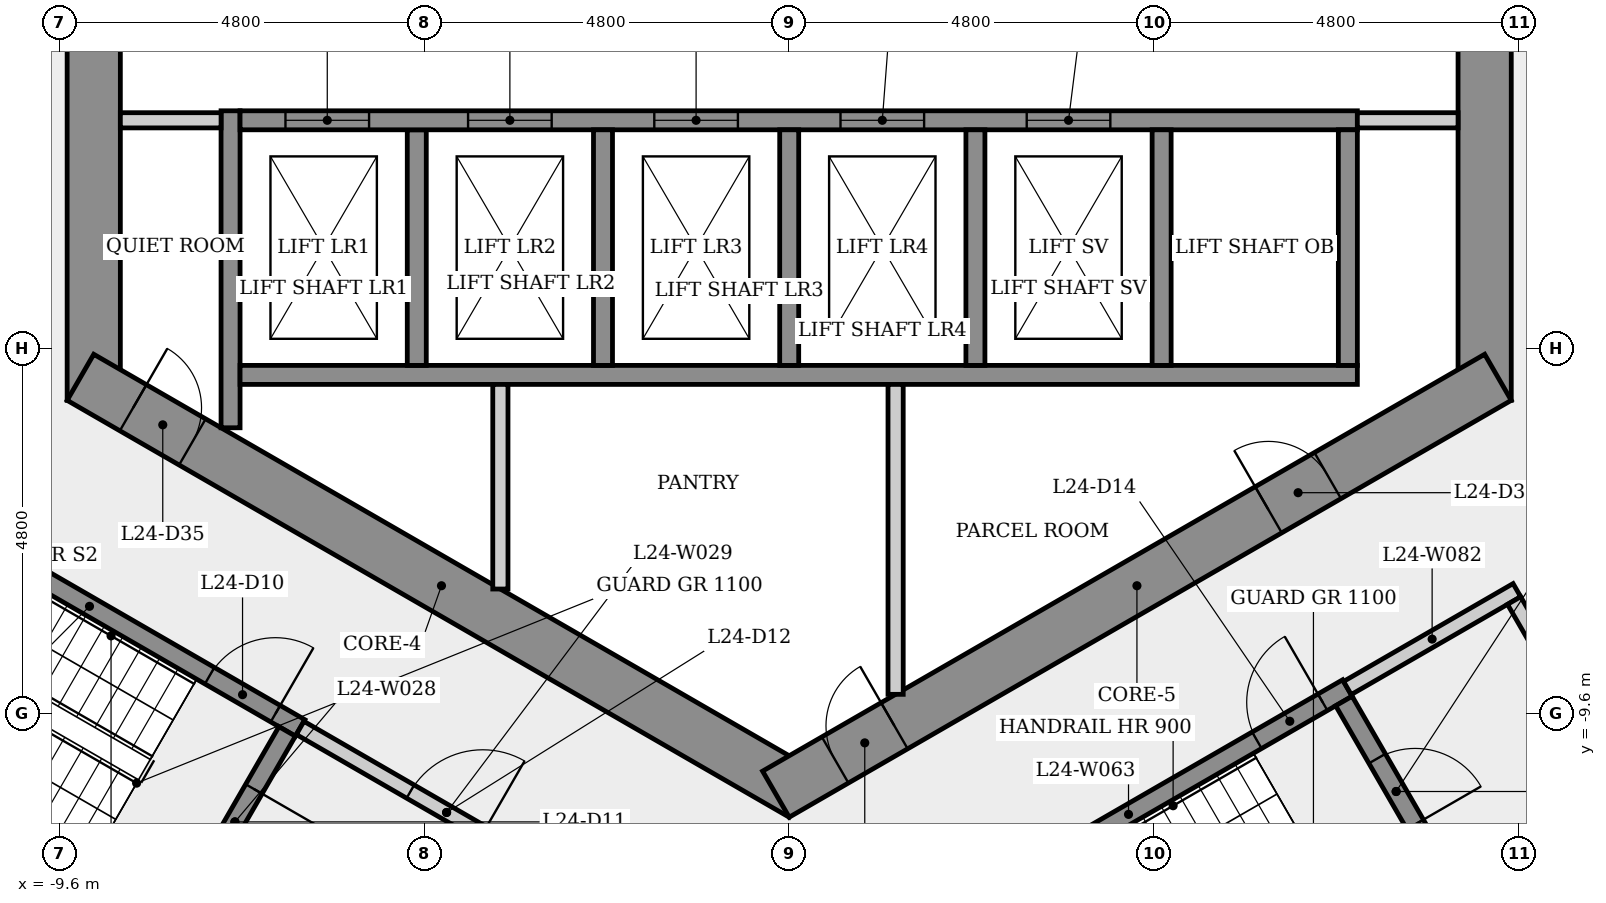
"""IFC4 building model, lengths in metres.
Left out: names, types, materials, properties, quantities, classifications, styles, units other than length and angle.
Written with IfcOpenShell. Run it as: python <this file> out.ifc"""

import sys

from ifc_helpers import new_model, si_unit, direction, frame, frame_2d, origin, place, context, subcontext, project, spatial, rectangle, extrude, element, fill, save


model = new_model("IFC4")
c1 = context("Model", 3, precision=1e-05, world=origin(), true_north=direction((0.0, 1.0)))
c2 = subcontext(c1, "Body", "Model", "MODEL_VIEW")
j1 = project(units=[si_unit("LENGTHUNIT", "METRE"), si_unit("PLANEANGLEUNIT", "RADIAN")], contexts=[c1])
p1 = place(None, origin())
s1 = spatial("IfcSite", under=j1, at=p1, CompositionType="ELEMENT")
p2 = place(p1, origin())
s2 = spatial("IfcBuilding", under=s1, at=p2, CompositionType="ELEMENT")
p3 = place(p2, frame((0.0, 0.0, 93.3)))
s3 = spatial("IfcBuildingStorey", under=s2, at=p3, CompositionType="ELEMENT", Elevation=93.3)
p4 = place(p3, frame((9.15, -5.485, 0.0), z_axis=(0.0, 0.0, 1.0), x_axis=(0.0, 1.0, 0.0)))
e1 = element("IfcWall", 1, at=p4, inside=s3, PredefinedType="SHEAR", context=c2, shape_type="SweptSolid", body=[
    extrude(rectangle(XDim=10.97, YDim=0.7, at=frame_2d((5.485, 0.0))), origin(), (0.0, 0.0, 1.0), 3.4),
])
p5 = place(p4, frame((4.685, 0.0, 0.0)))
e2 = element("IfcOpeningElement", 2, at=p5, cuts=e1, PredefinedType="OPENING", context=c2, shape_type="SweptSolid", body=[
    extrude(rectangle(XDim=1.6, YDim=2.1, at=frame_2d((0.8, 1.05))), frame((0.0, 0.36, 0.0), z_axis=(0.0, -1.0, 0.0), x_axis=(1.0, 0.0, 0.0)), (0.0, 0.0, 1.0), 0.72),
])
p6 = place(p3, frame((-9.15, 5.485, 0.0), z_axis=(0.0, 0.0, 1.0), x_axis=(0.0, -1.0, 0.0)))
e3 = element("IfcWall", 3, at=p6, inside=s3, PredefinedType="SHEAR", context=c2, shape_type="SweptSolid", body=[
    extrude(rectangle(XDim=10.97, YDim=0.7, at=frame_2d((5.485, 0.0))), origin(), (0.0, 0.0, 1.0), 3.4),
])
p7 = place(p6, frame((4.685, 0.0, 0.0)))
e4 = element("IfcOpeningElement", 4, at=p7, cuts=e3, PredefinedType="OPENING", context=c2, shape_type="SweptSolid", body=[
    extrude(rectangle(XDim=1.6, YDim=2.1, at=frame_2d((0.8, 1.05))), frame((0.0, 0.36, 0.0), z_axis=(0.0, -1.0, 0.0), x_axis=(1.0, 0.0, 0.0)), (0.0, 0.0, 1.0), 0.72),
])
p8 = place(p3, frame((-9.325, -5.182, 0.0), z_axis=(0.0, 0.0, 1.0), x_axis=(0.866023993627, -0.500002442456, 0.0)))
e5 = element("IfcWall", 5, at=p8, inside=s3, PredefinedType="SHEAR", context=c2, shape_type="SweptSolid", body=[
    extrude(rectangle(XDim=10.97, YDim=0.7, at=frame_2d((5.485, 0.0))), origin(), (0.0, 0.0, 1.0), 3.4),
])
p9 = place(p8, frame((0.801, 0.0, 0.0)))
e6 = element("IfcOpeningElement", 6, at=p9, cuts=e5, PredefinedType="OPENING", context=c2, shape_type="SweptSolid", body=[
    extrude(rectangle(XDim=0.9, YDim=2.1, at=frame_2d((0.45, 1.05))), frame((0.0, 0.36, 0.0), z_axis=(0.0, -1.0, 0.0), x_axis=(1.0, 0.0, 0.0)), (0.0, 0.0, 1.0), 0.72),
])
p10 = place(p3, frame((-0.175, -10.667, 0.0), z_axis=(0.0, 0.0, 1.0), x_axis=(0.866023993627, 0.500002442456, 0.0)))
e7 = element("IfcWall", 7, at=p10, inside=s3, PredefinedType="SHEAR", context=c2, shape_type="SweptSolid", body=[
    extrude(rectangle(XDim=10.97, YDim=0.7, at=frame_2d((5.485, 0.0))), origin(), (0.0, 0.0, 1.0), 3.4),
])
p11 = place(p10, frame((0.9, 0.0, 0.0)))
e8 = element("IfcOpeningElement", 8, at=p11, cuts=e7, PredefinedType="OPENING", context=c2, shape_type="SweptSolid", body=[
    extrude(rectangle(XDim=0.9, YDim=2.1, at=frame_2d((0.45, 1.05))), frame((0.0, 0.36, 0.0), z_axis=(0.0, -1.0, 0.0), x_axis=(1.0, 0.0, 0.0)), (0.0, 0.0, 1.0), 0.72),
])
p12 = place(p10, frame((7.483, 0.0, 0.0)))
e9 = element("IfcOpeningElement", 9, at=p12, cuts=e7, PredefinedType="OPENING", context=c2, shape_type="SweptSolid", body=[
    extrude(rectangle(XDim=0.9, YDim=2.1, at=frame_2d((0.45, 1.05))), frame((0.0, 0.36, 0.0), z_axis=(0.0, -1.0, 0.0), x_axis=(1.0, 0.0, 0.0)), (0.0, 0.0, 1.0), 0.72),
])
p13 = place(p3, frame((-11.977, -6.595, 0.0), z_axis=(0.0, 0.0, 1.0), x_axis=(0.866025499775, -0.499999833739, 0.0)))
e10 = element("IfcWall", 10, at=p13, inside=s3, PredefinedType="SHEAR", context=c2, shape_type="SweptSolid", body=[
    extrude(rectangle(XDim=6.4, YDim=0.25, at=frame_2d((3.2, 0.0))), origin(), (0.0, 0.0, 1.0), 3.05),
])
p14 = place(p13, frame((5.025, 0.0, 0.0)))
e11 = element("IfcOpeningElement", 11, at=p14, cuts=e10, PredefinedType="OPENING", context=c2, shape_type="SweptSolid", body=[
    extrude(rectangle(XDim=1.0, YDim=2.1, at=frame_2d((0.5, 1.05))), frame((0.0, 0.135, 0.0), z_axis=(0.0, -1.0, 0.0), x_axis=(1.0, 0.0, 0.0)), (0.0, 0.0, 1.0), 0.27),
])
p15 = place(p3, frame((-7.935, -12.393, 0.0), z_axis=(0.0, 0.0, 1.0), x_axis=(-0.866025499775, 0.499999833739, 0.0)))
e12 = element("IfcWall", 12, at=p15, inside=s3, PredefinedType="SHEAR", context=c2, shape_type="SweptSolid", body=[
    extrude(rectangle(XDim=6.4, YDim=0.25, at=frame_2d((3.2, 0.0))), origin(), (0.0, 0.0, 1.0), 3.05),
])
p16 = place(p3, frame((-7.35, -5.846, 0.0), z_axis=(0.0, 0.0, 1.0), x_axis=(0.0, 1.0, 0.0)))
e13 = element("IfcWall", 13, at=p16, inside=s3, PredefinedType="SHEAR", context=c2, shape_type="SweptSolid", body=[
    extrude(rectangle(XDim=4.171, YDim=0.25, at=frame_2d((2.085, 0.0))), origin(), (0.0, 0.0, 1.0), 3.05),
])
p17 = place(p3, frame((-7.475, -1.8, 0.0), z_axis=(0.0, 0.0, 1.0), x_axis=(-1.0, 0.0, 0.0)))
e14 = element("IfcWall", 14, at=p17, inside=s3, PredefinedType="PARTITIONING", context=c2, shape_type="SweptSolid", body=[
    extrude(rectangle(XDim=1.325, YDim=0.2, at=frame_2d((0.663, 0.0))), origin(), (0.0, 0.0, 1.0), 3.05),
])
p18 = place(p3, frame((-6.605, -9.841, 0.0), z_axis=(0.0, 0.0, 1.0), x_axis=(-0.499996545922, -0.866027397988, 0.0)))
e15 = element("IfcWall", 15, at=p18, inside=s3, PredefinedType="SHEAR", context=c2, shape_type="SweptSolid", body=[
    extrude(rectangle(XDim=2.75, YDim=0.25, at=frame_2d((1.375, 0.0))), origin(), (0.0, 0.0, 1.0), 3.05),
])
p19 = place(p18, frame((0.875, 0.0, 0.0)))
e16 = element("IfcOpeningElement", 16, at=p19, cuts=e15, PredefinedType="OPENING", context=c2, shape_type="SweptSolid", body=[
    extrude(rectangle(XDim=1.0, YDim=2.1, at=frame_2d((0.5, 1.05))), frame((0.0, 0.135, 0.0), z_axis=(0.0, -1.0, 0.0), x_axis=(1.0, 0.0, 0.0)), (0.0, 0.0, 1.0), 0.27),
])
p20 = place(p3, frame((-6.435, -9.795, 0.0), z_axis=(0.0, 0.0, 1.0), x_axis=(0.866012907634, -0.500021643343, 0.0)))
e17 = element("IfcWall", 17, at=p20, inside=s3, PredefinedType="PARTITIONING", context=c2, shape_type="SweptSolid", body=[
    extrude(rectangle(XDim=4.45, YDim=0.2, at=frame_2d((2.225, 0.0))), origin(), (0.0, 0.0, 1.0), 3.05),
])
p21 = place(p20, frame((1.675, 0.0, 0.0)))
e18 = element("IfcOpeningElement", 18, at=p21, cuts=e17, PredefinedType="OPENING", context=c2, shape_type="SweptSolid", body=[
    extrude(rectangle(XDim=1.1, YDim=2.1, at=frame_2d((0.55, 1.05))), frame((0.0, 0.11, 0.0), z_axis=(0.0, -1.0, 0.0), x_axis=(1.0, 0.0, 0.0)), (0.0, 0.0, 1.0), 0.22),
])
p22 = place(p3, frame((-7.225, -5.15, 0.0), z_axis=(0.0, 0.0, 1.0), x_axis=(1.0, 0.0, 0.0)))
e19 = element("IfcWall", 19, at=p22, inside=s3, PredefinedType="SHEAR", context=c2, shape_type="SweptSolid", body=[
    extrude(rectangle(XDim=14.7, YDim=0.25, at=frame_2d((7.35, 0.0))), origin(), (0.0, 0.0, 1.0), 3.05),
])
p23 = place(p3, frame((-4.9, -1.925, 0.0), z_axis=(0.0, 0.0, 1.0), x_axis=(0.0, -1.0, 0.0)))
e20 = element("IfcWall", 20, at=p23, inside=s3, PredefinedType="SHEAR", context=c2, shape_type="SweptSolid", body=[
    extrude(rectangle(XDim=3.1, YDim=0.25, at=frame_2d((1.55, 0.0))), origin(), (0.0, 0.0, 1.0), 3.4),
])
p24 = place(p3, frame((-7.225, -1.8, 0.0), z_axis=(0.0, 0.0, 1.0), x_axis=(1.0, 0.0, 0.0)))
e21 = element("IfcWall", 21, at=p24, inside=s3, PredefinedType="SHEAR", context=c2, shape_type="SweptSolid", body=[
    extrude(rectangle(XDim=14.7, YDim=0.25, at=frame_2d((7.35, 0.0))), origin(), (0.0, 0.0, 1.0), 3.05),
])
p25 = place(p24, frame((0.597, 0.0, 0.0)))
e22 = element("IfcOpeningElement", 22, at=p25, cuts=e21, PredefinedType="OPENING", context=c2, shape_type="SweptSolid", body=[
    extrude(rectangle(XDim=1.1, YDim=2.1, at=frame_2d((0.55, 1.05))), frame((0.0, 0.135, 0.0), z_axis=(0.0, -1.0, 0.0), x_axis=(1.0, 0.0, 0.0)), (0.0, 0.0, 1.0), 0.27),
])
p26 = place(p24, frame((3.0, 0.0, 0.0)))
e23 = element("IfcOpeningElement", 23, at=p26, cuts=e21, PredefinedType="OPENING", context=c2, shape_type="SweptSolid", body=[
    extrude(rectangle(XDim=1.1, YDim=2.1, at=frame_2d((0.55, 1.05))), frame((0.0, 0.135, 0.0), z_axis=(0.0, -1.0, 0.0), x_axis=(1.0, 0.0, 0.0)), (0.0, 0.0, 1.0), 0.27),
])
p27 = place(p24, frame((5.45, 0.0, 0.0)))
e24 = element("IfcOpeningElement", 24, at=p27, cuts=e21, PredefinedType="OPENING", context=c2, shape_type="SweptSolid", body=[
    extrude(rectangle(XDim=1.1, YDim=2.1, at=frame_2d((0.55, 1.05))), frame((0.0, 0.135, 0.0), z_axis=(0.0, -1.0, 0.0), x_axis=(1.0, 0.0, 0.0)), (0.0, 0.0, 1.0), 0.27),
])
p28 = place(p24, frame((7.9, 0.0, 0.0)))
e25 = element("IfcOpeningElement", 25, at=p28, cuts=e21, PredefinedType="OPENING", context=c2, shape_type="SweptSolid", body=[
    extrude(rectangle(XDim=1.1, YDim=2.1, at=frame_2d((0.55, 1.05))), frame((0.0, 0.135, 0.0), z_axis=(0.0, -1.0, 0.0), x_axis=(1.0, 0.0, 0.0)), (0.0, 0.0, 1.0), 0.27),
])
p29 = place(p24, frame((10.35, 0.0, 0.0)))
e26 = element("IfcOpeningElement", 26, at=p29, cuts=e21, PredefinedType="OPENING", context=c2, shape_type="SweptSolid", body=[
    extrude(rectangle(XDim=1.1, YDim=2.1, at=frame_2d((0.55, 1.05))), frame((0.0, 0.135, 0.0), z_axis=(0.0, -1.0, 0.0), x_axis=(1.0, 0.0, 0.0)), (0.0, 0.0, 1.0), 0.27),
])
p30 = place(p3, frame((-3.8, -5.275, 0.0), z_axis=(0.0, 0.0, 1.0), x_axis=(0.0, -1.0, 0.0)))
e27 = element("IfcWall", 27, at=p30, inside=s3, PredefinedType="PARTITIONING", context=c2, shape_type="SweptSolid", body=[
    extrude(rectangle(XDim=2.692, YDim=0.2, at=frame_2d((1.346, 0.0))), origin(), (0.0, 0.0, 1.0), 3.05),
])
for number, where, z_axis, x_axis in (
    (28, (-2.45, -1.925, 0.0), (0.0, 0.0, 1.0), (0.0, -1.0, 0.0)),
    (29, (0.0, -1.925, 0.0), (0.0, 0.0, 1.0), (0.0, -1.0, 0.0)),
):
    element("IfcWall", number, at=place(p3, frame(where, z_axis=z_axis, x_axis=x_axis)), inside=s3, PredefinedType="SHEAR", context=c2, shape_type="SweptSolid", body=[
        extrude(rectangle(XDim=3.1, YDim=0.25, at=frame_2d((1.55, 0.0))), origin(), (0.0, 0.0, 1.0), 3.4),
    ])
p31 = place(p3, frame((1.4, -5.275, 0.0), z_axis=(0.0, 0.0, 1.0), x_axis=(0.0, -1.0, 0.0)))
e30 = element("IfcWall", 30, at=p31, inside=s3, PredefinedType="PARTITIONING", context=c2, shape_type="SweptSolid", body=[
    extrude(rectangle(XDim=4.078, YDim=0.2, at=frame_2d((2.039, 0.0))), origin(), (0.0, 0.0, 1.0), 3.05),
])
p32 = place(p3, frame((1.585, -12.595, 0.0), z_axis=(0.0, 0.0, 1.0), x_axis=(0.866036417653, 0.499980922934, 0.0)))
e31 = element("IfcWall", 31, at=p32, inside=s3, PredefinedType="SHEAR", context=c2, shape_type="SweptSolid", body=[
    extrude(rectangle(XDim=6.65, YDim=0.25, at=frame_2d((3.325, 0.0))), origin(), (0.0, 0.0, 1.0), 3.05),
])
p33 = place(p32, frame((5.275, 0.0, 0.0)))
e32 = element("IfcOpeningElement", 32, at=p33, cuts=e31, PredefinedType="OPENING", context=c2, shape_type="SweptSolid", body=[
    extrude(rectangle(XDim=1.0, YDim=2.1, at=frame_2d((0.5, 1.05))), frame((0.0, 0.135, 0.0), z_axis=(0.0, -1.0, 0.0), x_axis=(1.0, 0.0, 0.0)), (0.0, 0.0, 1.0), 0.27),
])
for number, where, z_axis, x_axis in (
    (33, (2.45, -1.925, 0.0), (0.0, 0.0, 1.0), (0.0, -1.0, 0.0)),
    (34, (4.9, -1.925, 0.0), (0.0, 0.0, 1.0), (0.0, -1.0, 0.0)),
):
    element("IfcWall", number, at=place(p3, frame(where, z_axis=z_axis, x_axis=x_axis)), inside=s3, PredefinedType="SHEAR", context=c2, shape_type="SweptSolid", body=[
        extrude(rectangle(XDim=3.1, YDim=0.25, at=frame_2d((1.55, 0.0))), origin(), (0.0, 0.0, 1.0), 3.4),
    ])
p34 = place(p3, frame((7.298, -9.441, 0.0), z_axis=(0.0, 0.0, 1.0), x_axis=(0.500034990121, -0.866005201286, 0.0)))
e35 = element("IfcWall", 35, at=p34, inside=s3, PredefinedType="SHEAR", context=c2, shape_type="SweptSolid", body=[
    extrude(rectangle(XDim=2.75, YDim=0.25, at=frame_2d((1.375, 0.0))), origin(), (0.0, 0.0, 1.0), 3.05),
])
p35 = place(p34, frame((0.875, 0.0, 0.0)))
e36 = element("IfcOpeningElement", 36, at=p35, cuts=e35, PredefinedType="OPENING", context=c2, shape_type="SweptSolid", body=[
    extrude(rectangle(XDim=1.0, YDim=2.1, at=frame_2d((0.5, 1.05))), frame((0.0, 0.135, 0.0), z_axis=(0.0, -1.0, 0.0), x_axis=(1.0, 0.0, 0.0)), (0.0, 0.0, 1.0), 0.27),
])
p36 = place(p3, frame((7.344, -9.27, 0.0), z_axis=(0.0, 0.0, 1.0), x_axis=(0.866005588531, 0.500034319456, 0.0)))
e37 = element("IfcWall", 37, at=p36, inside=s3, PredefinedType="PARTITIONING", context=c2, shape_type="SweptSolid", body=[
    extrude(rectangle(XDim=2.575, YDim=0.2, at=frame_2d((1.288, 0.0))), origin(), (0.0, 0.0, 1.0), 3.05),
])
p37 = place(p3, frame((7.35, -1.925, 0.0), z_axis=(0.0, 0.0, 1.0), x_axis=(0.0, -1.0, 0.0)))
e38 = element("IfcWall", 38, at=p37, inside=s3, PredefinedType="SHEAR", context=c2, shape_type="SweptSolid", body=[
    extrude(rectangle(XDim=3.1, YDim=0.25, at=frame_2d((1.55, 0.0))), origin(), (0.0, 0.0, 1.0), 3.4),
])
p38 = place(p3, frame((8.8, -1.8, 0.0), z_axis=(0.0, 0.0, 1.0), x_axis=(-1.0, 0.0, 0.0)))
e39 = element("IfcWall", 39, at=p38, inside=s3, PredefinedType="PARTITIONING", context=c2, shape_type="SweptSolid", body=[
    extrude(rectangle(XDim=1.325, YDim=0.2, at=frame_2d((0.663, 0.0))), origin(), (0.0, 0.0, 1.0), 3.05),
])
p39 = place(p3, frame((9.537, -8.119, 0.0), z_axis=(0.0, 0.0, 1.0), x_axis=(0.499990139034, -0.866031096941, 0.0)))
e40 = element("IfcWall", 40, at=p39, inside=s3, PredefinedType="PARTITIONING", context=c2, shape_type="SweptSolid", body=[
    extrude(rectangle(XDim=3.0, YDim=0.2, at=frame_2d((1.5, 0.0))), origin(), (0.0, 0.0, 1.0), 3.05),
])
p40 = place(p39, frame((0.935, 0.0, 0.0)))
e41 = element("IfcOpeningElement", 41, at=p40, cuts=e40, PredefinedType="OPENING", context=c2, shape_type="SweptSolid", body=[
    extrude(rectangle(XDim=1.0, YDim=2.1, at=frame_2d((0.5, 1.05))), frame((0.0, 0.11, 0.0), z_axis=(0.0, -1.0, 0.0), x_axis=(1.0, 0.0, 0.0)), (0.0, 0.0, 1.0), 0.22),
])
p41 = place(p3, frame((10.901, -10.681, 0.0), z_axis=(0.0, 0.0, 1.0), x_axis=(-0.866007538022, -0.500030943131, 0.0)))
e42 = element("IfcWall", 42, at=p41, inside=s3, PredefinedType="PARTITIONING", context=c2, shape_type="SweptSolid", body=[
    extrude(rectangle(XDim=2.375, YDim=0.2, at=frame_2d((1.188, 0.0))), origin(), (0.0, 0.0, 1.0), 3.05),
])
p42 = place(p25, origin())
e43 = element("IfcDoor", 43, at=p42, inside=s3, OperationType="SLIDING_TO_LEFT", PredefinedType="DOOR", context=c2, shape_type="SweptSolid", body=[
    extrude(rectangle(XDim=1.1, YDim=2.1, at=frame_2d((0.55, 1.05))), frame((0.0, 0.025, 0.0), z_axis=(0.0, -1.0, 0.0), x_axis=(1.0, 0.0, 0.0)), (0.0, 0.0, 1.0), 0.05),
])
fill(e22, e43)
p43 = place(p26, origin())
e44 = element("IfcDoor", 44, at=p43, inside=s3, OperationType="SLIDING_TO_LEFT", PredefinedType="DOOR", context=c2, shape_type="SweptSolid", body=[
    extrude(rectangle(XDim=1.1, YDim=2.1, at=frame_2d((0.55, 1.05))), frame((0.0, 0.025, 0.0), z_axis=(0.0, -1.0, 0.0), x_axis=(1.0, 0.0, 0.0)), (0.0, 0.0, 1.0), 0.05),
])
fill(e23, e44)
p44 = place(p27, origin())
e45 = element("IfcDoor", 45, at=p44, inside=s3, OperationType="SLIDING_TO_LEFT", PredefinedType="DOOR", context=c2, shape_type="SweptSolid", body=[
    extrude(rectangle(XDim=1.1, YDim=2.1, at=frame_2d((0.55, 1.05))), frame((0.0, 0.025, 0.0), z_axis=(0.0, -1.0, 0.0), x_axis=(1.0, 0.0, 0.0)), (0.0, 0.0, 1.0), 0.05),
])
fill(e24, e45)
p45 = place(p28, origin())
e46 = element("IfcDoor", 46, at=p45, inside=s3, OperationType="SLIDING_TO_LEFT", PredefinedType="DOOR", context=c2, shape_type="SweptSolid", body=[
    extrude(rectangle(XDim=1.1, YDim=2.1, at=frame_2d((0.55, 1.05))), frame((0.0, 0.025, 0.0), z_axis=(0.0, -1.0, 0.0), x_axis=(1.0, 0.0, 0.0)), (0.0, 0.0, 1.0), 0.05),
])
fill(e25, e46)
p46 = place(p29, origin())
e47 = element("IfcDoor", 47, at=p46, inside=s3, OperationType="SLIDING_TO_LEFT", PredefinedType="DOOR", context=c2, shape_type="SweptSolid", body=[
    extrude(rectangle(XDim=1.1, YDim=2.1, at=frame_2d((0.55, 1.05))), frame((0.0, 0.025, 0.0), z_axis=(0.0, -1.0, 0.0), x_axis=(1.0, 0.0, 0.0)), (0.0, 0.0, 1.0), 0.05),
])
fill(e26, e47)
p47 = place(p14, origin())
e48 = element("IfcDoor", 48, at=p47, inside=s3, OperationType="SINGLE_SWING_RIGHT", PredefinedType="DOOR", context=c2, shape_type="SweptSolid", body=[
    extrude(rectangle(XDim=1.0, YDim=2.1, at=frame_2d((0.5, 1.05))), frame((0.0, 0.025, 0.0), z_axis=(0.0, -1.0, 0.0), x_axis=(1.0, 0.0, 0.0)), (0.0, 0.0, 1.0), 0.05),
])
fill(e11, e48)
p48 = place(p19, origin())
e49 = element("IfcDoor", 49, at=p48, inside=s3, OperationType="SINGLE_SWING_LEFT", PredefinedType="DOOR", context=c2, shape_type="SweptSolid", body=[
    extrude(rectangle(XDim=1.0, YDim=2.1, at=frame_2d((0.5, 1.05))), frame((0.0, 0.025, 0.0), z_axis=(0.0, -1.0, 0.0), x_axis=(1.0, 0.0, 0.0)), (0.0, 0.0, 1.0), 0.05),
])
fill(e16, e49)
p49 = place(p21, origin())
e50 = element("IfcDoor", 50, at=p49, inside=s3, OperationType="SINGLE_SWING_RIGHT", PredefinedType="DOOR", context=c2, shape_type="SweptSolid", body=[
    extrude(rectangle(XDim=1.1, YDim=2.1, at=frame_2d((0.55, 1.05))), frame((0.0, 0.025, 0.0), z_axis=(0.0, -1.0, 0.0), x_axis=(1.0, 0.0, 0.0)), (0.0, 0.0, 1.0), 0.05),
])
fill(e18, e50)
p50 = place(p33, origin())
e51 = element("IfcDoor", 51, at=p50, inside=s3, OperationType="SINGLE_SWING_RIGHT", PredefinedType="DOOR", context=c2, shape_type="SweptSolid", body=[
    extrude(rectangle(XDim=1.0, YDim=2.1, at=frame_2d((0.5, 1.05))), frame((0.0, 0.025, 0.0), z_axis=(0.0, -1.0, 0.0), x_axis=(1.0, 0.0, 0.0)), (0.0, 0.0, 1.0), 0.05),
])
fill(e32, e51)
p51 = place(p35, origin())
e52 = element("IfcDoor", 52, at=p51, inside=s3, OperationType="SINGLE_SWING_RIGHT", PredefinedType="DOOR", context=c2, shape_type="SweptSolid", body=[
    extrude(rectangle(XDim=1.0, YDim=2.1, at=frame_2d((0.5, 1.05))), frame((0.0, 0.025, 0.0), z_axis=(0.0, -1.0, 0.0), x_axis=(1.0, 0.0, 0.0)), (0.0, 0.0, 1.0), 0.05),
])
fill(e36, e52)
p52 = place(p9, origin())
e53 = element("IfcDoor", 53, at=p52, inside=s3, OperationType="SINGLE_SWING_LEFT", PredefinedType="DOOR", context=c2, shape_type="SweptSolid", body=[
    extrude(rectangle(XDim=0.9, YDim=2.1, at=frame_2d((0.45, 1.05))), frame((0.0, 0.025, 0.0), z_axis=(0.0, -1.0, 0.0), x_axis=(1.0, 0.0, 0.0)), (0.0, 0.0, 1.0), 0.05),
])
fill(e6, e53)
p53 = place(p11, origin())
e54 = element("IfcDoor", 54, at=p53, inside=s3, OperationType="SINGLE_SWING_RIGHT", PredefinedType="DOOR", context=c2, shape_type="SweptSolid", body=[
    extrude(rectangle(XDim=0.9, YDim=2.1, at=frame_2d((0.45, 1.05))), frame((0.0, 0.025, 0.0), z_axis=(0.0, -1.0, 0.0), x_axis=(1.0, 0.0, 0.0)), (0.0, 0.0, 1.0), 0.05),
])
fill(e8, e54)
p54 = place(p12, origin())
e55 = element("IfcDoor", 55, at=p54, inside=s3, OperationType="SINGLE_SWING_LEFT", PredefinedType="DOOR", context=c2, shape_type="SweptSolid", body=[
    extrude(rectangle(XDim=0.9, YDim=2.1, at=frame_2d((0.45, 1.05))), frame((0.0, 0.025, 0.0), z_axis=(0.0, -1.0, 0.0), x_axis=(1.0, 0.0, 0.0)), (0.0, 0.0, 1.0), 0.05),
])
fill(e9, e55)
save(model, sys.argv[1])
